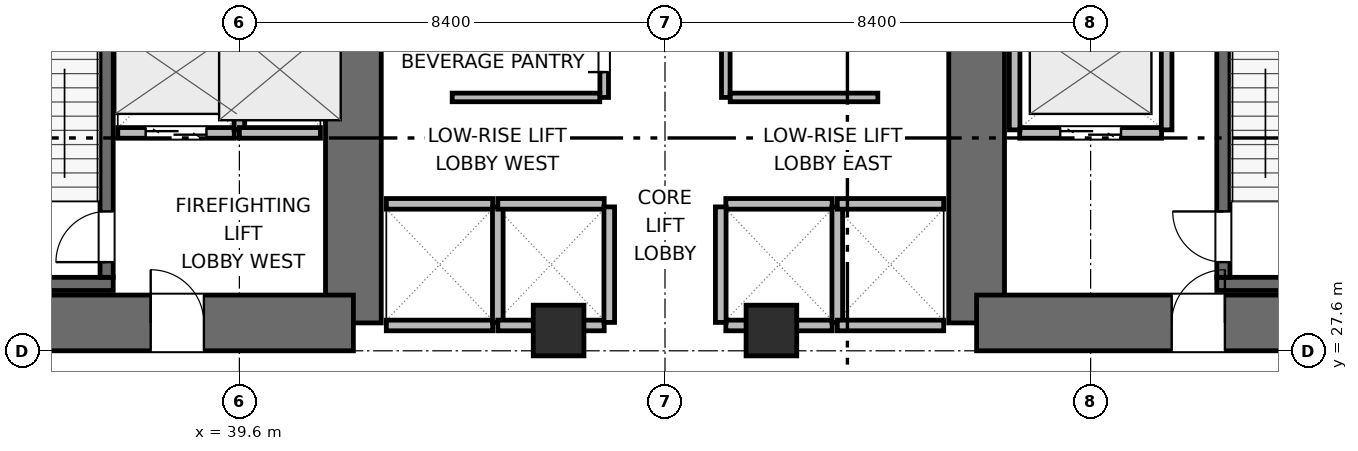
"""IFC4 building model, lengths in metres.
Left out: names, types, materials, properties, quantities, classifications, styles, units other than length and angle.
Written with IfcOpenShell. Run it as: python <this file> out.ifc"""

import sys

from ifc_helpers import new_model, si_unit, direction, frame, frame_2d, origin, origin_2d, place, context, subcontext, project, spatial, rectangle, extrude, element, fill, save


model = new_model("IFC4")
c1 = context("Model", 3, precision=1e-05, world=origin(), true_north=direction((0.0, 1.0)))
c2 = subcontext(c1, "Body", "Model", "MODEL_VIEW")
j1 = project(units=[si_unit("LENGTHUNIT", "METRE"), si_unit("PLANEANGLEUNIT", "RADIAN")], contexts=[c1])
p1 = place(None, origin())
s1 = spatial("IfcSite", under=j1, at=p1, CompositionType="ELEMENT")
p2 = place(p1, origin())
s2 = spatial("IfcBuilding", under=s1, at=p2, CompositionType="ELEMENT")
p3 = place(p2, frame((0.0, 0.0, 4.5)))
s3 = spatial("IfcBuildingStorey", under=s2, at=p3, CompositionType="ELEMENT", Elevation=4.5)
p4 = place(p3, frame((41.85, 28.15, 0.0), z_axis=(0.0, 0.0, 1.0), x_axis=(0.0, 1.0, 0.0)))
e1 = element("IfcWall", 1, at=p4, inside=s3, PredefinedType="SHEAR", context=c2, shape_type="SweptSolid", body=[
    extrude(rectangle(XDim=6.25, YDim=1.1, at=frame_2d((3.125, 0.0))), origin(), (0.0, 0.0, 1.0), 4.2),
])
p5 = place(p3, frame((32.95, 28.15, 0.0), z_axis=(0.0, 0.0, 1.0), x_axis=(1.0, 0.0, 0.0)))
e2 = element("IfcWall", 2, at=p5, inside=s3, PredefinedType="SHEAR", context=c2, shape_type="SweptSolid", body=[
    extrude(rectangle(XDim=8.9, YDim=1.1, at=frame_2d((4.45, 0.0))), origin(), (0.0, 0.0, 1.0), 4.2),
])
p6 = place(p5, frame((4.9, 0.0, 0.0)))
e3 = element("IfcOpeningElement", 3, at=p6, cuts=e2, PredefinedType="OPENING", context=c2, shape_type="SweptSolid", body=[
    extrude(rectangle(XDim=1.05, YDim=2.04, at=frame_2d((0.525, 1.02))), frame((0.0, 0.56, 0.0), z_axis=(0.0, -1.0, 0.0), x_axis=(1.0, 0.0, 0.0)), (0.0, 0.0, 1.0), 1.12),
])
p7 = place(p3, frame((54.15, 28.15, 0.0), z_axis=(0.0, 0.0, 1.0), x_axis=(0.0, 1.0, 0.0)))
e4 = element("IfcWall", 4, at=p7, inside=s3, PredefinedType="SHEAR", context=c2, shape_type="SweptSolid", body=[
    extrude(rectangle(XDim=7.65, YDim=1.1, at=frame_2d((3.825, 0.0))), origin(), (0.0, 0.0, 1.0), 4.2),
])
p8 = place(p3, frame((54.15, 28.15, 0.0), z_axis=(0.0, 0.0, 1.0), x_axis=(1.0, 0.0, 0.0)))
e5 = element("IfcWall", 5, at=p8, inside=s3, PredefinedType="SHEAR", context=c2, shape_type="SweptSolid", body=[
    extrude(rectangle(XDim=8.9, YDim=1.1, at=frame_2d((4.45, 0.0))), origin(), (0.0, 0.0, 1.0), 4.2),
])
p9 = place(p8, frame((3.85, 0.0, 0.0)))
e6 = element("IfcOpeningElement", 6, at=p9, cuts=e5, PredefinedType="OPENING", context=c2, shape_type="SweptSolid", body=[
    extrude(rectangle(XDim=1.05, YDim=2.04, at=frame_2d((0.525, 1.02))), frame((0.0, 0.56, 0.0), z_axis=(0.0, -1.0, 0.0), x_axis=(1.0, 0.0, 0.0)), (0.0, 0.0, 1.0), 1.12),
])
p10 = place(p3, frame((33.5, 28.92, 0.0), z_axis=(0.0, 0.0, 1.0), x_axis=(1.0, 0.0, 0.0)))
e7 = element("IfcWall", 7, at=p10, inside=s3, PredefinedType="SHEAR", context=c2, shape_type="SweptSolid", body=[
    extrude(rectangle(XDim=3.61, YDim=0.26, at=frame_2d((1.805, 0.0))), origin(), (0.0, 0.0, 1.0), 4.2),
])
p11 = place(p3, frame((36.98, 29.05, 0.0), z_axis=(0.0, 0.0, 1.0), x_axis=(0.0, 1.0, 0.0)))
e8 = element("IfcWall", 8, at=p11, inside=s3, PredefinedType="SHEAR", context=c2, shape_type="SweptSolid", body=[
    extrude(rectangle(XDim=7.6, YDim=0.26, at=frame_2d((3.8, 0.0))), origin(), (0.0, 0.0, 1.0), 4.2),
])
p12 = place(p11, frame((0.3, 0.0, 0.0)))
e9 = element("IfcOpeningElement", 9, at=p12, cuts=e8, PredefinedType="OPENING", context=c2, shape_type="SweptSolid", body=[
    extrude(rectangle(XDim=1.0, YDim=2.04, at=frame_2d((0.5, 1.02))), frame((0.0, 0.14, 0.0), z_axis=(0.0, -1.0, 0.0), x_axis=(1.0, 0.0, 0.0)), (0.0, 0.0, 1.0), 0.28),
])
p13 = place(p3, frame((58.89, 28.92, 0.0), z_axis=(0.0, 0.0, 1.0), x_axis=(1.0, 0.0, 0.0)))
e10 = element("IfcWall", 10, at=p13, inside=s3, PredefinedType="SHEAR", context=c2, shape_type="SweptSolid", body=[
    extrude(rectangle(XDim=3.61, YDim=0.26, at=frame_2d((1.805, 0.0))), origin(), (0.0, 0.0, 1.0), 4.2),
])
p14 = place(p3, frame((59.02, 29.05, 0.0), z_axis=(0.0, 0.0, 1.0), x_axis=(0.0, 1.0, 0.0)))
e11 = element("IfcWall", 11, at=p14, inside=s3, PredefinedType="SHEAR", context=c2, shape_type="SweptSolid", body=[
    extrude(rectangle(XDim=7.6, YDim=0.26, at=frame_2d((3.8, 0.0))), origin(), (0.0, 0.0, 1.0), 4.2),
])
p15 = place(p14, frame((0.3, 0.0, 0.0)))
e12 = element("IfcOpeningElement", 12, at=p15, cuts=e11, PredefinedType="OPENING", context=c2, shape_type="SweptSolid", body=[
    extrude(rectangle(XDim=1.0, YDim=2.04, at=frame_2d((0.5, 1.02))), frame((0.0, 0.14, 0.0), z_axis=(0.0, -1.0, 0.0), x_axis=(1.0, 0.0, 0.0)), (0.0, 0.0, 1.0), 0.28),
])
for number, where, z_axis, x_axis in (
    (13, (45.9, 28.0, 0.0), (0.0, 0.0, 1.0), (1.0, 0.0, 0.0)),
    (14, (50.1, 28.0, 0.0), (0.0, 0.0, 1.0), (1.0, 0.0, 0.0)),
):
    element("IfcColumn", number, at=place(p3, frame(where, z_axis=z_axis, x_axis=x_axis)), inside=s3, PredefinedType="COLUMN", context=c2, shape_type="SweptSolid", body=[
        extrude(rectangle(XDim=1.0, YDim=1.0, at=origin_2d()), origin(), (0.0, 0.0, 1.0), 4.2),
    ])
p16 = place(p3, frame((37.2, 31.9, 0.0), z_axis=(0.0, 0.0, 1.0), x_axis=(1.0, 0.0, 0.0)))
e15 = element("IfcWall", 15, at=p16, inside=s3, PredefinedType="PARTITIONING", context=c2, shape_type="SweptSolid", body=[
    extrude(rectangle(XDim=2.3, YDim=0.21, at=frame_2d((1.15, 0.0))), origin(), (0.0, 0.0, 1.0), 3.88),
])
p17 = place(p16, frame((0.55, 0.0, 0.0)))
e16 = element("IfcOpeningElement", 16, at=p17, cuts=e15, PredefinedType="OPENING", context=c2, shape_type="SweptSolid", body=[
    extrude(rectangle(XDim=1.2, YDim=2.04, at=frame_2d((0.6, 1.02))), frame((0.0, 0.115, 0.0), z_axis=(0.0, -1.0, 0.0), x_axis=(1.0, 0.0, 0.0)), (0.0, 0.0, 1.0), 0.23),
])
p18 = place(p3, frame((39.6, 31.96, 0.0), z_axis=(0.0, 0.0, 1.0), x_axis=(0.0, 1.0, 0.0)))
e17 = element("IfcWall", 17, at=p18, inside=s3, PredefinedType="PARTITIONING", context=c2, shape_type="SweptSolid", body=[
    extrude(rectangle(XDim=2.28, YDim=0.21, at=frame_2d((1.14, 0.0))), origin(), (0.0, 0.0, 1.0), 3.88),
])
p19 = place(p3, frame((55.0, 31.9, 0.0), z_axis=(0.0, 0.0, 1.0), x_axis=(1.0, 0.0, 0.0)))
e18 = element("IfcWall", 18, at=p19, inside=s3, PredefinedType="PARTITIONING", context=c2, shape_type="SweptSolid", body=[
    extrude(rectangle(XDim=2.8, YDim=0.21, at=frame_2d((1.4, 0.0))), origin(), (0.0, 0.0, 1.0), 3.88),
])
p20 = place(p19, frame((0.8, 0.0, 0.0)))
e19 = element("IfcOpeningElement", 19, at=p20, cuts=e18, PredefinedType="OPENING", context=c2, shape_type="SweptSolid", body=[
    extrude(rectangle(XDim=1.2, YDim=2.04, at=frame_2d((0.6, 1.02))), frame((0.0, 0.115, 0.0), z_axis=(0.0, -1.0, 0.0), x_axis=(1.0, 0.0, 0.0)), (0.0, 0.0, 1.0), 0.23),
])
for number, where, z_axis, x_axis in (
    (20, (54.9, 31.96, 0.0), (0.0, 0.0, 1.0), (0.0, 1.0, 0.0)),
    (21, (57.9, 31.96, 0.0), (0.0, 0.0, 1.0), (0.0, 1.0, 0.0)),
):
    element("IfcWall", number, at=place(p3, frame(where, z_axis=z_axis, x_axis=x_axis)), inside=s3, PredefinedType="PARTITIONING", context=c2, shape_type="SweptSolid", body=[
        extrude(rectangle(XDim=2.28, YDim=0.21, at=frame_2d((1.14, 0.0))), origin(), (0.0, 0.0, 1.0), 3.88),
    ])
p21 = place(p3, frame((39.6, 31.9, 0.0), z_axis=(0.0, 0.0, 1.0), x_axis=(1.0, 0.0, 0.0)))
e22 = element("IfcWall", 22, at=p21, inside=s3, PredefinedType="PARTITIONING", context=c2, shape_type="SweptSolid", body=[
    extrude(rectangle(XDim=1.6, YDim=0.21, at=frame_2d((0.8, 0.0))), origin(), (0.0, 0.0, 1.0), 3.88),
])
p22 = place(p3, frame((42.5, 30.5, 0.0), z_axis=(0.0, 0.0, 1.0), x_axis=(1.0, 0.0, 0.0)))
e23 = element("IfcWall", 23, at=p22, inside=s3, PredefinedType="PARTITIONING", context=c2, shape_type="SweptSolid", body=[
    extrude(rectangle(XDim=2.1, YDim=0.21, at=frame_2d((1.05, 0.0))), origin(), (0.0, 0.0, 1.0), 3.88),
])
p23 = place(p3, frame((42.5, 28.1, 0.0), z_axis=(0.0, 0.0, 1.0), x_axis=(1.0, 0.0, 0.0)))
e24 = element("IfcWall", 24, at=p23, inside=s3, PredefinedType="PARTITIONING", context=c2, shape_type="SweptSolid", body=[
    extrude(rectangle(XDim=2.1, YDim=0.21, at=frame_2d((1.05, 0.0))), origin(), (0.0, 0.0, 1.0), 2.765),
])
p24 = place(p3, frame((44.7, 28.16, 0.0), z_axis=(0.0, 0.0, 1.0), x_axis=(0.0, 1.0, 0.0)))
e25 = element("IfcWall", 25, at=p24, inside=s3, PredefinedType="PARTITIONING", context=c2, shape_type="SweptSolid", body=[
    extrude(rectangle(XDim=2.28, YDim=0.21, at=frame_2d((1.14, 0.0))), origin(), (0.0, 0.0, 1.0), 3.88),
])
p25 = place(p3, frame((44.7, 30.5, 0.0), z_axis=(0.0, 0.0, 1.0), x_axis=(1.0, 0.0, 0.0)))
e26 = element("IfcWall", 26, at=p25, inside=s3, PredefinedType="PARTITIONING", context=c2, shape_type="SweptSolid", body=[
    extrude(rectangle(XDim=2.1, YDim=0.21, at=frame_2d((1.05, 0.0))), origin(), (0.0, 0.0, 1.0), 3.88),
])
p26 = place(p3, frame((44.7, 28.1, 0.0), z_axis=(0.0, 0.0, 1.0), x_axis=(1.0, 0.0, 0.0)))
e27 = element("IfcWall", 27, at=p26, inside=s3, PredefinedType="PARTITIONING", context=c2, shape_type="SweptSolid", body=[
    extrude(rectangle(XDim=2.1, YDim=0.21, at=frame_2d((1.05, 0.0))), origin(), (0.0, 0.0, 1.0), 2.765),
])
p27 = place(p3, frame((46.9, 28.16, 0.0), z_axis=(0.0, 0.0, 1.0), x_axis=(0.0, 1.0, 0.0)))
e28 = element("IfcWall", 28, at=p27, inside=s3, PredefinedType="PARTITIONING", context=c2, shape_type="SweptSolid", body=[
    extrude(rectangle(XDim=2.28, YDim=0.21, at=frame_2d((1.14, 0.0))), origin(), (0.0, 0.0, 1.0), 3.88),
])
p28 = place(p3, frame((49.2, 30.5, 0.0), z_axis=(0.0, 0.0, 1.0), x_axis=(1.0, 0.0, 0.0)))
e29 = element("IfcWall", 29, at=p28, inside=s3, PredefinedType="PARTITIONING", context=c2, shape_type="SweptSolid", body=[
    extrude(rectangle(XDim=2.1, YDim=0.21, at=frame_2d((1.05, 0.0))), origin(), (0.0, 0.0, 1.0), 3.88),
])
p29 = place(p3, frame((49.2, 28.1, 0.0), z_axis=(0.0, 0.0, 1.0), x_axis=(1.0, 0.0, 0.0)))
e30 = element("IfcWall", 30, at=p29, inside=s3, PredefinedType="PARTITIONING", context=c2, shape_type="SweptSolid", body=[
    extrude(rectangle(XDim=2.1, YDim=0.21, at=frame_2d((1.05, 0.0))), origin(), (0.0, 0.0, 1.0), 2.765),
])
for number, where, z_axis, x_axis in (
    (31, (49.1, 28.16, 0.0), (0.0, 0.0, 1.0), (0.0, 1.0, 0.0)),
    (32, (51.4, 28.16, 0.0), (0.0, 0.0, 1.0), (0.0, 1.0, 0.0)),
):
    element("IfcWall", number, at=place(p3, frame(where, z_axis=z_axis, x_axis=x_axis)), inside=s3, PredefinedType="PARTITIONING", context=c2, shape_type="SweptSolid", body=[
        extrude(rectangle(XDim=2.28, YDim=0.21, at=frame_2d((1.14, 0.0))), origin(), (0.0, 0.0, 1.0), 3.88),
    ])
p30 = place(p3, frame((51.4, 30.5, 0.0), z_axis=(0.0, 0.0, 1.0), x_axis=(1.0, 0.0, 0.0)))
e33 = element("IfcWall", 33, at=p30, inside=s3, PredefinedType="PARTITIONING", context=c2, shape_type="SweptSolid", body=[
    extrude(rectangle(XDim=2.1, YDim=0.21, at=frame_2d((1.05, 0.0))), origin(), (0.0, 0.0, 1.0), 3.88),
])
p31 = place(p3, frame((51.4, 28.1, 0.0), z_axis=(0.0, 0.0, 1.0), x_axis=(1.0, 0.0, 0.0)))
e34 = element("IfcWall", 34, at=p31, inside=s3, PredefinedType="PARTITIONING", context=c2, shape_type="SweptSolid", body=[
    extrude(rectangle(XDim=2.1, YDim=0.21, at=frame_2d((1.05, 0.0))), origin(), (0.0, 0.0, 1.0), 2.765),
])
p32 = place(p3, frame((46.8, 32.6, 0.0), z_axis=(0.0, 0.0, 1.0), x_axis=(0.0, 1.0, 0.0)))
e35 = element("IfcWall", 35, at=p32, inside=s3, PredefinedType="PARTITIONING", context=c2, shape_type="SweptSolid", body=[
    extrude(rectangle(XDim=3.8, YDim=0.17, at=frame_2d((1.9, 0.0))), origin(), (0.0, 0.0, 1.0), 3.88),
])
p33 = place(p32, frame((0.5, 0.0, 0.0)))
e36 = element("IfcOpeningElement", 36, at=p33, cuts=e35, PredefinedType="OPENING", context=c2, shape_type="SweptSolid", body=[
    extrude(rectangle(XDim=0.9, YDim=2.02, at=frame_2d((0.45, 1.01))), frame((0.0, 0.095, 0.0), z_axis=(0.0, -1.0, 0.0), x_axis=(1.0, 0.0, 0.0)), (0.0, 0.0, 1.0), 0.19),
])
p34 = place(p32, frame((2.4, 0.0, 0.0)))
e37 = element("IfcOpeningElement", 37, at=p34, cuts=e35, PredefinedType="OPENING", context=c2, shape_type="SweptSolid", body=[
    extrude(rectangle(XDim=0.9, YDim=2.02, at=frame_2d((0.45, 1.01))), frame((0.0, 0.095, 0.0), z_axis=(0.0, -1.0, 0.0), x_axis=(1.0, 0.0, 0.0)), (0.0, 0.0, 1.0), 0.19),
])
p35 = place(p3, frame((43.8, 32.6, 0.0), z_axis=(0.0, 0.0, 1.0), x_axis=(1.0, 0.0, 0.0)))
e38 = element("IfcWall", 38, at=p35, inside=s3, PredefinedType="PARTITIONING", context=c2, shape_type="SweptSolid", body=[
    extrude(rectangle(XDim=2.913, YDim=0.17, at=frame_2d((1.457, 0.0))), origin(), (0.0, 0.0, 1.0), 3.88),
])
p36 = place(p3, frame((49.2, 32.6, 0.0), z_axis=(0.0, 0.0, 1.0), x_axis=(0.0, 1.0, 0.0)))
e39 = element("IfcWall", 39, at=p36, inside=s3, PredefinedType="PARTITIONING", context=c2, shape_type="SweptSolid", body=[
    extrude(rectangle(XDim=3.4, YDim=0.17, at=frame_2d((1.7, 0.0))), origin(), (0.0, 0.0, 1.0), 3.88),
])
p37 = place(p36, frame((1.25, 0.0, 0.0)))
e40 = element("IfcOpeningElement", 40, at=p37, cuts=e39, PredefinedType="OPENING", context=c2, shape_type="SweptSolid", body=[
    extrude(rectangle(XDim=0.9, YDim=2.02, at=frame_2d((0.45, 1.01))), frame((0.0, 0.095, 0.0), z_axis=(0.0, -1.0, 0.0), x_axis=(1.0, 0.0, 0.0)), (0.0, 0.0, 1.0), 0.19),
])
p38 = place(p3, frame((49.287, 32.6, 0.0), z_axis=(0.0, 0.0, 1.0), x_axis=(1.0, 0.0, 0.0)))
e41 = element("IfcWall", 41, at=p38, inside=s3, PredefinedType="PARTITIONING", context=c2, shape_type="SweptSolid", body=[
    extrude(rectangle(XDim=2.913, YDim=0.17, at=frame_2d((1.457, 0.0))), origin(), (0.0, 0.0, 1.0), 3.88),
])
p39 = place(p12, origin())
e42 = element("IfcDoor", 42, at=p39, inside=s3, OperationType="SINGLE_SWING_LEFT", PredefinedType="DOOR", context=c2, shape_type="SweptSolid", body=[
    extrude(rectangle(XDim=1.0, YDim=2.04, at=frame_2d((0.5, 1.02))), frame((0.0, 0.025, 0.0), z_axis=(0.0, -1.0, 0.0), x_axis=(1.0, 0.0, 0.0)), (0.0, 0.0, 1.0), 0.05),
])
fill(e9, e42)
p40 = place(p15, origin())
e43 = element("IfcDoor", 43, at=p40, inside=s3, OperationType="SINGLE_SWING_RIGHT", PredefinedType="DOOR", context=c2, shape_type="SweptSolid", body=[
    extrude(rectangle(XDim=1.0, YDim=2.04, at=frame_2d((0.5, 1.02))), frame((0.0, 0.025, 0.0), z_axis=(0.0, -1.0, 0.0), x_axis=(1.0, 0.0, 0.0)), (0.0, 0.0, 1.0), 0.05),
])
fill(e12, e43)
p41 = place(p17, origin())
e44 = element("IfcDoor", 44, at=p41, inside=s3, OperationType="DOUBLE_DOOR_SLIDING", PredefinedType="DOOR", context=c2, shape_type="SweptSolid", body=[
    extrude(rectangle(XDim=1.2, YDim=2.04, at=frame_2d((0.6, 1.02))), frame((0.0, 0.025, 0.0), z_axis=(0.0, -1.0, 0.0), x_axis=(1.0, 0.0, 0.0)), (0.0, 0.0, 1.0), 0.05),
])
fill(e16, e44)
p42 = place(p20, origin())
e45 = element("IfcDoor", 45, at=p42, inside=s3, OperationType="DOUBLE_DOOR_SLIDING", PredefinedType="DOOR", context=c2, shape_type="SweptSolid", body=[
    extrude(rectangle(XDim=1.2, YDim=2.04, at=frame_2d((0.6, 1.02))), frame((0.0, 0.025, 0.0), z_axis=(0.0, -1.0, 0.0), x_axis=(1.0, 0.0, 0.0)), (0.0, 0.0, 1.0), 0.05),
])
fill(e19, e45)
p43 = place(p6, origin())
e46 = element("IfcDoor", 46, at=p43, inside=s3, OperationType="SINGLE_SWING_LEFT", PredefinedType="DOOR", context=c2, shape_type="SweptSolid", body=[
    extrude(rectangle(XDim=1.05, YDim=2.04, at=frame_2d((0.525, 1.02))), frame((0.0, 0.025, 0.0), z_axis=(0.0, -1.0, 0.0), x_axis=(1.0, 0.0, 0.0)), (0.0, 0.0, 1.0), 0.05),
])
fill(e3, e46)
p44 = place(p9, origin())
e47 = element("IfcDoor", 47, at=p44, inside=s3, OperationType="SINGLE_SWING_RIGHT", PredefinedType="DOOR", context=c2, shape_type="SweptSolid", body=[
    extrude(rectangle(XDim=1.05, YDim=2.04, at=frame_2d((0.525, 1.02))), frame((0.0, 0.025, 0.0), z_axis=(0.0, -1.0, 0.0), x_axis=(1.0, 0.0, 0.0)), (0.0, 0.0, 1.0), 0.05),
])
fill(e6, e47)
p45 = place(p33, origin())
e48 = element("IfcDoor", 48, at=p45, inside=s3, OperationType="SINGLE_SWING_LEFT", PredefinedType="DOOR", context=c2, shape_type="SweptSolid", body=[
    extrude(rectangle(XDim=0.9, YDim=2.02, at=frame_2d((0.45, 1.01))), frame((0.0, 0.025, 0.0), z_axis=(0.0, -1.0, 0.0), x_axis=(1.0, 0.0, 0.0)), (0.0, 0.0, 1.0), 0.05),
])
fill(e36, e48)
save(model, sys.argv[1])
